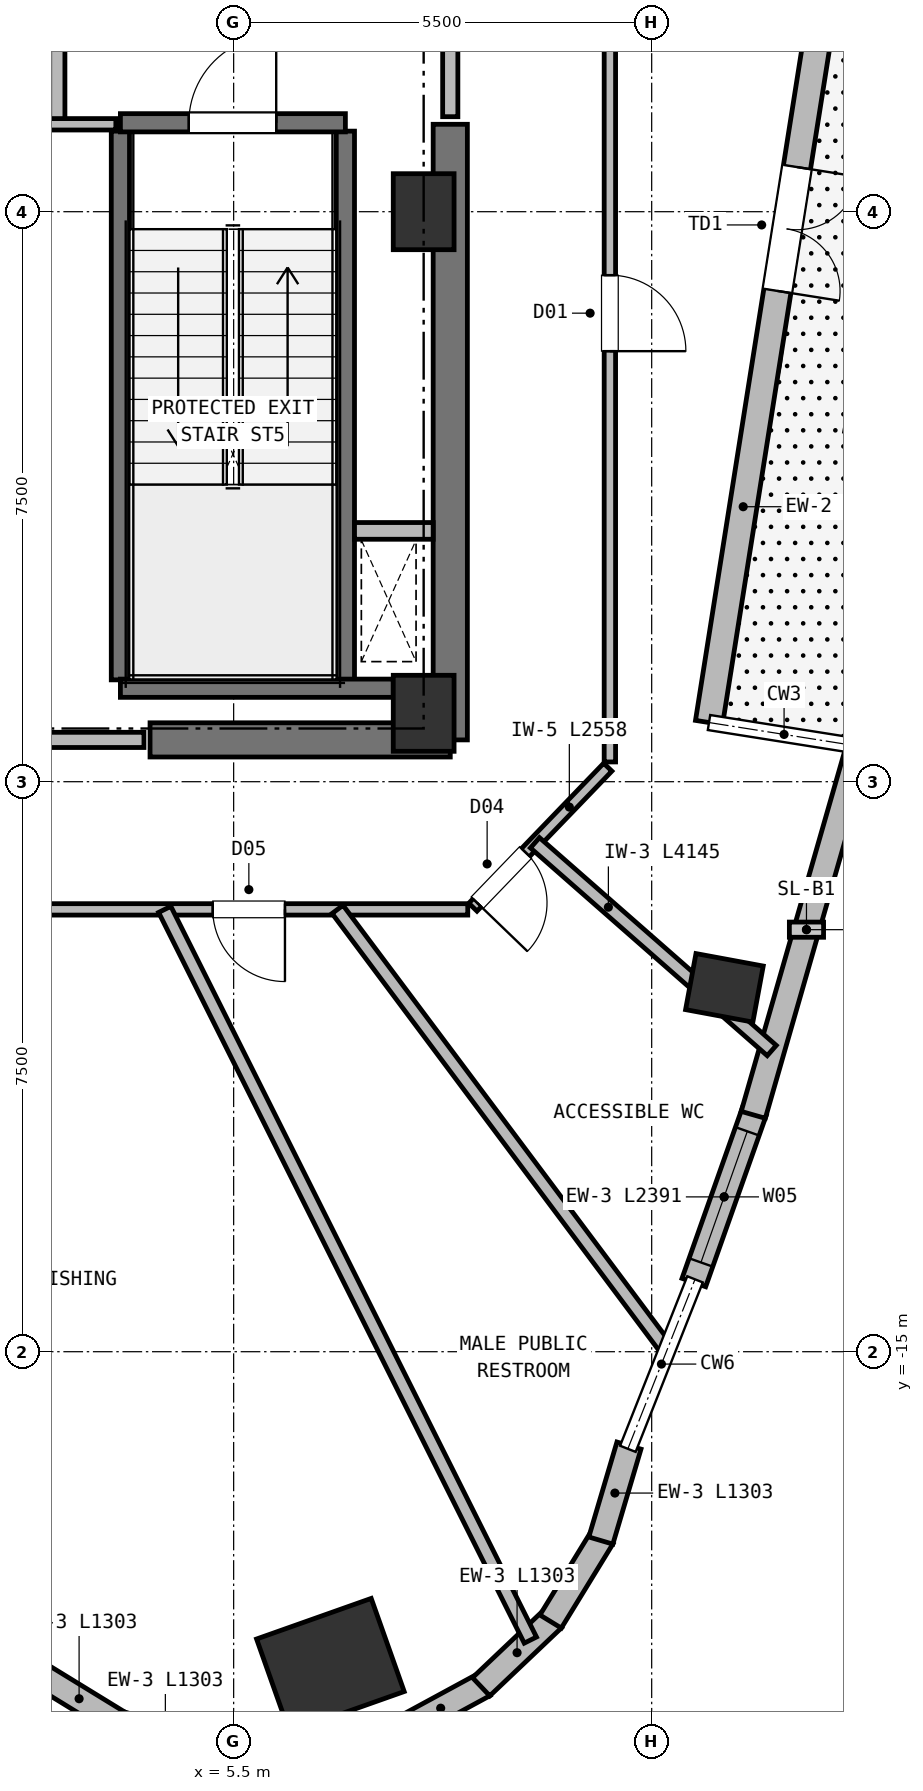
"""IFC4 building model, lengths in metres.
Left out: names, types, materials, properties, quantities, classifications, styles, units other than length and angle.
Written with IfcOpenShell. Run it as: python <this file> out.ifc"""

import sys

from ifc_helpers import new_model, si_unit, direction, frame, frame_2d, origin, origin_2d, place, context, subcontext, project, spatial, rectangle, extrude, element, fill, save


model = new_model("IFC4")
c1 = context("Model", 3, precision=1e-05, world=origin(), true_north=direction((0.0, 1.0)))
c2 = subcontext(c1, "Body", "Model", "MODEL_VIEW")
j1 = project(units=[si_unit("LENGTHUNIT", "METRE"), si_unit("PLANEANGLEUNIT", "RADIAN")], contexts=[c1])
p1 = place(None, origin())
s1 = spatial("IfcSite", under=j1, at=p1, CompositionType="ELEMENT")
p2 = place(p1, origin())
s2 = spatial("IfcBuilding", under=s1, at=p2, CompositionType="ELEMENT")
p3 = place(p2, frame((0.0, 0.0, 277.2)))
s3 = spatial("IfcBuildingStorey", under=s2, at=p3, CompositionType="ELEMENT", Elevation=277.2)
for number, where, z_axis, x_axis in (
    (1, (8.0, -6.6, 0.0), (0.0, 0.0, 1.0), (1.0, 0.0, 0.0)),
    (2, (8.0, 0.0, 0.0), (0.0, 0.0, 1.0), (1.0, 0.0, 0.0)),
):
    element("IfcColumn", number, at=place(p3, frame(where, z_axis=z_axis, x_axis=x_axis)), inside=s3, PredefinedType="COLUMN", context=c2, shape_type="SweptSolid", body=[
        extrude(rectangle(XDim=0.8, YDim=1.0, at=origin_2d()), origin(), (0.0, 0.0, 1.0), 4.4),
    ])
p4 = place(p3, frame((4.4, -6.95, 0.0), z_axis=(0.0, 0.0, 1.0), x_axis=(1.0, 0.0, 0.0)))
e3 = element("IfcWall", 3, at=p4, inside=s3, PredefinedType="SHEAR", context=c2, shape_type="SweptSolid", body=[
    extrude(rectangle(XDim=3.95, YDim=0.45, at=frame_2d((1.975, 0.0))), origin(), (0.0, 0.0, 1.0), 4.15),
])
p5 = place(p3, frame((8.35, -6.95, 0.0), z_axis=(0.0, 0.0, 1.0), x_axis=(0.0, 1.0, 0.0)))
e4 = element("IfcWall", 4, at=p5, inside=s3, PredefinedType="SHEAR", context=c2, shape_type="SweptSolid", body=[
    extrude(rectangle(XDim=8.1, YDim=0.45, at=frame_2d((4.05, 0.0))), origin(), (0.0, 0.0, 1.0), 4.15),
])
p6 = place(p3, frame((6.773, -19.126, 0.0), z_axis=(0.0, 0.0, 1.0), x_axis=(-0.333806859234, 0.942641491092, 0.0)))
e5 = element("IfcColumn", 5, at=p6, inside=s3, PredefinedType="COLUMN", context=c2, shape_type="SweptSolid", body=[
    extrude(rectangle(XDim=1.3, YDim=1.6, at=origin_2d()), origin(), (0.0, 0.0, 1.0), 4.4),
])
p7 = place(p3, frame((11.957, -10.212, 0.0), z_axis=(0.0, 0.0, 1.0), x_axis=(0.182235525492, 0.983254907564, 0.0)))
e6 = element("IfcColumn", 6, at=p7, inside=s3, PredefinedType="COLUMN", context=c2, shape_type="SweptSolid", body=[
    extrude(rectangle(XDim=0.75, YDim=0.9, at=origin_2d()), origin(), (0.0, 0.0, 1.0), 4.4),
])
p8 = place(p3, frame((13.256, 2.76, 0.0), z_axis=(0.0, 0.0, 1.0), x_axis=(-0.156430085978, -0.987689034161, 0.0)))
e7 = element("IfcWall", 7, at=p8, inside=s3, PredefinedType="SOLIDWALL", context=c2, shape_type="SweptSolid", body=[
    extrude(rectangle(XDim=9.6, YDim=0.36, at=frame_2d((4.8, 0.0))), origin(), (0.0, 0.0, 1.0), 3.86),
])
p9 = place(p8, frame((2.2, 0.0, 0.0)))
e8 = element("IfcOpeningElement", 8, at=p9, cuts=e7, PredefinedType="OPENING", context=c2, shape_type="SweptSolid", body=[
    extrude(rectangle(XDim=1.65, YDim=2.25, at=frame_2d((0.825, 1.125))), frame((0.0, 0.19, 0.0), z_axis=(0.0, -1.0, 0.0), x_axis=(1.0, 0.0, 0.0)), (0.0, 0.0, 1.0), 0.38),
])
for number, where, z_axis, x_axis in (
    (9, (4.022, -19.906, 0.0), (0.0, 0.0, 1.0), (-0.853, 0.523, 0.0)),
    (10, (5.226, -20.256, 0.0), (0.0, 0.0, 1.0), (-0.959, 0.284, 0.0)),
):
    element("IfcWall", number, at=place(p3, frame(where, z_axis=z_axis, x_axis=x_axis)), inside=s3, PredefinedType="SOLIDWALL", context=c2, shape_type="SweptSolid", body=[
        extrude(rectangle(XDim=1.303, YDim=0.33, at=frame_2d((0.652, 0.0))), origin(), (0.0, 0.0, 1.0), 4.15),
    ])
p10 = place(p3, frame((8.796, -19.38, 0.0), z_axis=(0.0, 0.0, 1.0), x_axis=(-0.878774855812, -0.477236579478, 0.0)))
e11 = element("IfcWall", 11, at=p10, inside=s3, PredefinedType="SOLIDWALL", context=c2, shape_type="SweptSolid", body=[
    extrude(rectangle(XDim=1.303, YDim=0.33, at=frame_2d((0.651, 0.0))), origin(), (0.0, 0.0, 1.0), 4.15),
])
p11 = place(p3, frame((9.701, -18.512, 0.0), z_axis=(0.0, 0.0, 1.0), x_axis=(-0.725415712612, -0.688311008118, 0.0)))
e12 = element("IfcWall", 12, at=p11, inside=s3, PredefinedType="SOLIDWALL", context=c2, shape_type="SweptSolid", body=[
    extrude(rectangle(XDim=1.303, YDim=0.33, at=frame_2d((0.651, 0.0))), origin(), (0.0, 0.0, 1.0), 4.15),
])
p12 = place(p3, frame((10.351, -17.439, 0.0), z_axis=(0.0, 0.0, 1.0), x_axis=(-0.522601602676, -0.852577014047, 0.0)))
e13 = element("IfcWall", 13, at=p12, inside=s3, PredefinedType="SOLIDWALL", context=c2, shape_type="SweptSolid", body=[
    extrude(rectangle(XDim=1.303, YDim=0.33, at=frame_2d((0.651, 0.0))), origin(), (0.0, 0.0, 1.0), 4.15),
])
p13 = place(p3, frame((10.701, -16.235, 0.0), z_axis=(0.0, 0.0, 1.0), x_axis=(-0.284011785169, -0.958820789243, 0.0)))
e14 = element("IfcWall", 14, at=p13, inside=s3, PredefinedType="SOLIDWALL", context=c2, shape_type="SweptSolid", body=[
    extrude(rectangle(XDim=1.303, YDim=0.33, at=frame_2d((0.652, 0.0))), origin(), (0.0, 0.0, 1.0), 4.15),
])
p14 = place(p3, frame((12.352, -11.836, 0.0), z_axis=(0.0, 0.0, 1.0), x_axis=(-0.333391562563, -0.942788452418, 0.0)))
e15 = element("IfcWall", 15, at=p14, inside=s3, PredefinedType="SOLIDWALL", context=c2, shape_type="SweptSolid", body=[
    extrude(rectangle(XDim=2.391, YDim=0.33, at=frame_2d((1.195, 0.0))), origin(), (0.0, 0.0, 1.0), 4.15),
])
p15 = place(p14, frame((0.281, 0.0, 0.72)))
e16 = element("IfcOpeningElement", 16, at=p15, cuts=e15, PredefinedType="OPENING", context=c2, shape_type="SweptSolid", body=[
    extrude(rectangle(XDim=1.83, YDim=2.15, at=frame_2d((0.915, 1.075))), frame((0.0, 0.175, 0.0), z_axis=(0.0, -1.0, 0.0), x_axis=(1.0, 0.0, 0.0)), (0.0, 0.0, 1.0), 0.35),
])
p16 = place(p3, frame((13.737, -7.01, 0.0), z_axis=(0.0, 0.0, 1.0), x_axis=(-0.276151755944, -0.9611140451, 0.0)))
e17 = element("IfcWall", 17, at=p16, inside=s3, PredefinedType="SOLIDWALL", context=c2, shape_type="SweptSolid", body=[
    extrude(rectangle(XDim=5.07, YDim=0.33, at=frame_2d((2.535, 0.0))), origin(), (0.0, 0.0, 1.0), 3.58),
])
for number, where, z_axis, x_axis in (
    (18, (4.01, -6.16, 0.0), (0.0, 0.0, 1.0), (0.0, 1.0, 0.0)),
    (19, (6.97, -6.16, 0.0), (0.0, 0.0, 1.0), (0.0, 1.0, 0.0)),
):
    element("IfcWall", number, at=place(p3, frame(where, z_axis=z_axis, x_axis=x_axis)), inside=s3, PredefinedType="SHEAR", context=c2, shape_type="SweptSolid", body=[
        extrude(rectangle(XDim=7.22, YDim=0.24, at=frame_2d((3.61, 0.0))), origin(), (0.0, 0.0, 1.0), 4.15),
    ])
p17 = place(p3, frame((4.01, -6.27, 0.0), z_axis=(0.0, 0.0, 1.0), x_axis=(1.0, 0.0, 0.0)))
e20 = element("IfcWall", 20, at=p17, inside=s3, PredefinedType="SHEAR", context=c2, shape_type="SweptSolid", body=[
    extrude(rectangle(XDim=3.59, YDim=0.24, at=frame_2d((1.795, 0.0))), origin(), (0.0, 0.0, 1.0), 4.15),
])
p18 = place(p3, frame((4.01, 1.17, 0.0), z_axis=(0.0, 0.0, 1.0), x_axis=(1.0, 0.0, 0.0)))
e21 = element("IfcWall", 21, at=p18, inside=s3, PredefinedType="SHEAR", context=c2, shape_type="SweptSolid", body=[
    extrude(rectangle(XDim=2.96, YDim=0.24, at=frame_2d((1.48, 0.0))), origin(), (0.0, 0.0, 1.0), 4.15),
])
p19 = place(p18, frame((0.9, 0.0, 0.0)))
e22 = element("IfcOpeningElement", 22, at=p19, cuts=e21, PredefinedType="OPENING", context=c2, shape_type="SweptSolid", body=[
    extrude(rectangle(XDim=1.15, YDim=2.15, at=frame_2d((0.575, 1.075))), frame((0.0, 0.13, 0.0), z_axis=(0.0, -1.0, 0.0), x_axis=(1.0, 0.0, 0.0)), (0.0, 0.0, 1.0), 0.26),
])
p20 = place(p3, frame((7.09, -4.2, 0.0), z_axis=(0.0, 0.0, 1.0), x_axis=(1.0, 0.0, 0.0)))
e23 = element("IfcWall", 23, at=p20, inside=s3, PredefinedType="PARTITIONING", context=c2, shape_type="SweptSolid", body=[
    extrude(rectangle(XDim=1.035, YDim=0.22, at=frame_2d((0.518, 0.0))), origin(), (0.0, 0.0, 1.0), 4.15),
])
p21 = place(p3, frame((3.18, 1.15, 0.0), z_axis=(0.0, 0.0, 1.0), x_axis=(0.0, 1.0, 0.0)))
e24 = element("IfcWall", 24, at=p21, inside=s3, PredefinedType="PARTITIONING", context=c2, shape_type="SweptSolid", body=[
    extrude(rectangle(XDim=3.3, YDim=0.2, at=frame_2d((1.65, 0.0))), origin(), (0.0, 0.0, 1.0), 4.15),
])
p22 = place(p21, frame((1.08, 0.0, 0.0)))
e25 = element("IfcOpeningElement", 25, at=p22, cuts=e24, PredefinedType="OPENING", context=c2, shape_type="SweptSolid", body=[
    extrude(rectangle(XDim=1.15, YDim=2.15, at=frame_2d((0.575, 1.075))), frame((0.0, 0.11, 0.0), z_axis=(0.0, -1.0, 0.0), x_axis=(1.0, 0.0, 0.0)), (0.0, 0.0, 1.0), 0.22),
])
p23 = place(p3, frame((8.35, 1.25, 0.0), z_axis=(0.0, 0.0, 1.0), x_axis=(0.0, 1.0, 0.0)))
e26 = element("IfcWall", 26, at=p23, inside=s3, PredefinedType="PARTITIONING", context=c2, shape_type="SweptSolid", body=[
    extrude(rectangle(XDim=5.3, YDim=0.2, at=frame_2d((2.65, 0.0))), origin(), (0.0, 0.0, 1.0), 4.15),
])
p24 = place(p23, frame((0.95, 0.0, 0.0)))
e27 = element("IfcOpeningElement", 27, at=p24, cuts=e26, PredefinedType="OPENING", context=c2, shape_type="SweptSolid", body=[
    extrude(rectangle(XDim=1.15, YDim=2.15, at=frame_2d((0.575, 1.075))), frame((0.0, 0.11, 0.0), z_axis=(0.0, -1.0, 0.0), x_axis=(1.0, 0.0, 0.0)), (0.0, 0.0, 1.0), 0.22),
])
p25 = place(p3, frame((3.95, 1.15, 0.0), z_axis=(0.0, 0.0, 1.0), x_axis=(-1.0, 0.0, 0.0)))
e28 = element("IfcWall", 28, at=p25, inside=s3, PredefinedType="PARTITIONING", context=c2, shape_type="SweptSolid", body=[
    extrude(rectangle(XDim=7.9, YDim=0.15, at=frame_2d((3.95, 0.0))), origin(), (0.0, 0.0, 1.0), 4.15),
])
p26 = place(p25, frame((5.59, 0.0, 0.0)))
e29 = element("IfcOpeningElement", 29, at=p26, cuts=e28, PredefinedType="OPENING", context=c2, shape_type="SweptSolid", body=[
    extrude(rectangle(XDim=0.92, YDim=2.05, at=frame_2d((0.46, 1.025))), frame((0.0, 0.085, 0.0), z_axis=(0.0, -1.0, 0.0), x_axis=(1.0, 0.0, 0.0)), (0.0, 0.0, 1.0), 0.17),
])
p27 = place(p25, frame((2.14, 0.0, 0.0)))
e30 = element("IfcOpeningElement", 30, at=p27, cuts=e28, PredefinedType="OPENING", context=c2, shape_type="SweptSolid", body=[
    extrude(rectangle(XDim=0.92, YDim=2.05, at=frame_2d((0.46, 1.025))), frame((0.0, 0.085, 0.0), z_axis=(0.0, -1.0, 0.0), x_axis=(1.0, 0.0, 0.0)), (0.0, 0.0, 1.0), 0.17),
])
p28 = place(p3, frame((-4.32, -6.95, 0.0), z_axis=(0.0, 0.0, 1.0), x_axis=(1.0, 0.0, 0.0)))
e31 = element("IfcWall", 31, at=p28, inside=s3, PredefinedType="PARTITIONING", context=c2, shape_type="SweptSolid", body=[
    extrude(rectangle(XDim=8.64, YDim=0.2, at=frame_2d((4.32, 0.0))), origin(), (0.0, 0.0, 1.0), 4.15),
])
p29 = place(p3, frame((8.58, -9.18, 0.0), z_axis=(0.0, 0.0, 1.0), x_axis=(-1.0, 0.0, 0.0)))
e32 = element("IfcWall", 32, at=p29, inside=s3, PredefinedType="PARTITIONING", context=c2, shape_type="SweptSolid", body=[
    extrude(rectangle(XDim=17.16, YDim=0.15, at=frame_2d((8.58, 0.0))), origin(), (0.0, 0.0, 1.0), 3.86),
])
p30 = place(p29, frame((2.405, 0.0, 0.0)))
e33 = element("IfcOpeningElement", 33, at=p30, cuts=e32, PredefinedType="OPENING", context=c2, shape_type="SweptSolid", body=[
    extrude(rectangle(XDim=0.95, YDim=2.1, at=frame_2d((0.475, 1.05))), frame((0.0, 0.085, 0.0), z_axis=(0.0, -1.0, 0.0), x_axis=(1.0, 0.0, 0.0)), (0.0, 0.0, 1.0), 0.17),
])
p31 = place(p29, frame((8.404, 0.0, 0.0)))
e34 = element("IfcOpeningElement", 34, at=p31, cuts=e32, PredefinedType="OPENING", context=c2, shape_type="SweptSolid", body=[
    extrude(rectangle(XDim=1.0, YDim=2.15, at=frame_2d((0.5, 1.075))), frame((0.0, 0.085, 0.0), z_axis=(0.0, -1.0, 0.0), x_axis=(1.0, 0.0, 0.0)), (0.0, 0.0, 1.0), 0.17),
])
p32 = place(p3, frame((10.422, -7.309, 0.0), z_axis=(0.0, 0.0, 1.0), x_axis=(-0.693764562202, -0.720201869085, 0.0)))
e35 = element("IfcWall", 35, at=p32, inside=s3, PredefinedType="PARTITIONING", context=c2, shape_type="SweptSolid", body=[
    extrude(rectangle(XDim=2.558, YDim=0.15, at=frame_2d((1.279, 0.0))), origin(), (0.0, 0.0, 1.0), 4.15),
])
p33 = place(p32, frame((1.558, 0.0, 0.0)))
e36 = element("IfcOpeningElement", 36, at=p33, cuts=e35, PredefinedType="OPENING", context=c2, shape_type="SweptSolid", body=[
    extrude(rectangle(XDim=0.92, YDim=2.05, at=frame_2d((0.46, 1.025))), frame((0.0, 0.085, 0.0), z_axis=(0.0, -1.0, 0.0), x_axis=(1.0, 0.0, 0.0)), (0.0, 0.0, 1.0), 0.17),
])
p34 = place(p3, frame((10.45, 8.65, 0.0), z_axis=(0.0, 0.0, 1.0), x_axis=(0.0, -1.0, 0.0)))
e37 = element("IfcWall", 37, at=p34, inside=s3, PredefinedType="PARTITIONING", context=c2, shape_type="SweptSolid", body=[
    extrude(rectangle(XDim=15.89, YDim=0.15, at=frame_2d((7.945, 0.0))), origin(), (0.0, 0.0, 1.0), 3.86),
])
p35 = place(p34, frame((9.485, 0.0, 0.0)))
e38 = element("IfcOpeningElement", 38, at=p35, cuts=e37, PredefinedType="OPENING", context=c2, shape_type="SweptSolid", body=[
    extrude(rectangle(XDim=1.0, YDim=2.15, at=frame_2d((0.5, 1.075))), frame((0.0, 0.085, 0.0), z_axis=(0.0, -1.0, 0.0), x_axis=(1.0, 0.0, 0.0)), (0.0, 0.0, 1.0), 0.17),
])
p36 = place(p3, frame((9.464, -8.304, 0.0), z_axis=(0.0, 0.0, 1.0), x_axis=(0.75169660728, -0.659509067871, 0.0)))
e39 = element("IfcWall", 39, at=p36, inside=s3, PredefinedType="PARTITIONING", context=c2, shape_type="SweptSolid", body=[
    extrude(rectangle(XDim=4.145, YDim=0.18, at=frame_2d((2.072, 0.0))), origin(), (0.0, 0.0, 1.0), 4.15),
])
p37 = place(p3, frame((4.593, -9.18, 0.0), z_axis=(0.0, 0.0, 1.0), x_axis=(0.447458836271, -0.894304528582, 0.0)))
e40 = element("IfcWall", 40, at=p37, inside=s3, PredefinedType="PARTITIONING", context=c2, shape_type="SweptSolid", body=[
    extrude(rectangle(XDim=10.751, YDim=0.18, at=frame_2d((5.375, 0.0))), origin(), (0.0, 0.0, 1.0), 4.15),
])
p38 = place(p3, frame((6.867, -9.18, 0.0), z_axis=(0.0, 0.0, 1.0), x_axis=(0.598984906235, -0.800760315015, 0.0)))
e41 = element("IfcWall", 41, at=p38, inside=s3, PredefinedType="PARTITIONING", context=c2, shape_type="SweptSolid", body=[
    extrude(rectangle(XDim=7.238, YDim=0.18, at=frame_2d((3.619, 0.0))), origin(), (0.0, 0.0, 1.0), 4.15),
])
p39 = place(p9, origin())
e42 = element("IfcDoor", 42, at=p39, inside=s3, OperationType="DOUBLE_DOOR_SINGLE_SWING", PredefinedType="DOOR", context=c2, shape_type="SweptSolid", body=[
    extrude(rectangle(XDim=1.65, YDim=2.25, at=frame_2d((0.825, 1.125))), frame((0.0, 0.025, 0.0), z_axis=(0.0, -1.0, 0.0), x_axis=(1.0, 0.0, 0.0)), (0.0, 0.0, 1.0), 0.05),
])
fill(e8, e42)
p40 = place(p15, origin())
e43 = element("IfcWindow", 43, at=p40, inside=s3, PartitioningType="SINGLE_PANEL", PredefinedType="WINDOW", context=c2, shape_type="SweptSolid", body=[
    extrude(rectangle(XDim=1.83, YDim=2.15, at=frame_2d((0.915, 1.075))), frame((0.0, 0.03, 0.0), z_axis=(0.0, -1.0, 0.0), x_axis=(1.0, 0.0, 0.0)), (0.0, 0.0, 1.0), 0.06),
])
fill(e16, e43)
p41 = place(p19, origin())
e44 = element("IfcDoor", 44, at=p41, inside=s3, OperationType="SINGLE_SWING_RIGHT", PredefinedType="DOOR", context=c2, shape_type="SweptSolid", body=[
    extrude(rectangle(XDim=1.15, YDim=2.15, at=frame_2d((0.575, 1.075))), frame((0.0, 0.025, 0.0), z_axis=(0.0, -1.0, 0.0), x_axis=(1.0, 0.0, 0.0)), (0.0, 0.0, 1.0), 0.05),
])
fill(e22, e44)
p42 = place(p33, origin())
e45 = element("IfcDoor", 45, at=p42, inside=s3, OperationType="SINGLE_SWING_RIGHT", PredefinedType="DOOR", context=c2, shape_type="SweptSolid", body=[
    extrude(rectangle(XDim=0.92, YDim=2.05, at=frame_2d((0.46, 1.025))), frame((0.0, 0.025, 0.0), z_axis=(0.0, -1.0, 0.0), x_axis=(1.0, 0.0, 0.0)), (0.0, 0.0, 1.0), 0.05),
])
fill(e36, e45)
p43 = place(p30, origin())
e46 = element("IfcDoor", 46, at=p43, inside=s3, OperationType="SINGLE_SWING_LEFT", PredefinedType="DOOR", context=c2, shape_type="SweptSolid", body=[
    extrude(rectangle(XDim=0.95, YDim=2.1, at=frame_2d((0.475, 1.05))), frame((0.0, 0.025, 0.0), z_axis=(0.0, -1.0, 0.0), x_axis=(1.0, 0.0, 0.0)), (0.0, 0.0, 1.0), 0.05),
])
fill(e33, e46)
p44 = place(p35, origin())
e47 = element("IfcDoor", 47, at=p44, inside=s3, OperationType="SINGLE_SWING_RIGHT", PredefinedType="DOOR", context=c2, shape_type="SweptSolid", body=[
    extrude(rectangle(XDim=1.0, YDim=2.15, at=frame_2d((0.5, 1.075))), frame((0.0, 0.025, 0.0), z_axis=(0.0, -1.0, 0.0), x_axis=(1.0, 0.0, 0.0)), (0.0, 0.0, 1.0), 0.05),
])
fill(e38, e47)
save(model, sys.argv[1])
